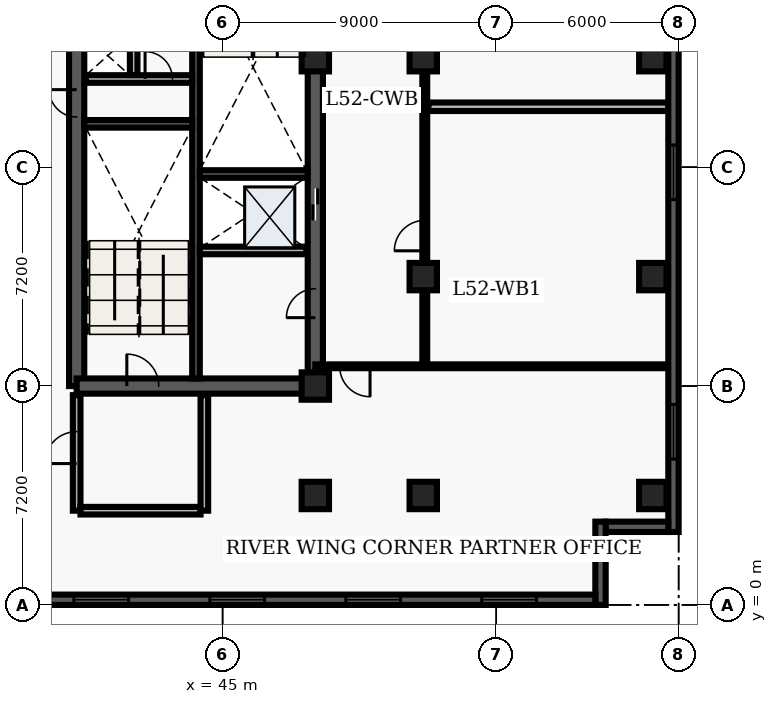
"""IFC4 building model, lengths in metres.
Left out: names, types, materials, properties, quantities, classifications, styles, units other than length and angle.
Written with IfcOpenShell. Run it as: python <this file> out.ifc"""

import sys

from ifc_helpers import new_model, entity, si_unit, converted_unit, direction, frame, origin_with_axes, origin_2d_with_axis, place, context, subcontext, project, spatial, polyline, rectangle, outline, extrude, element, fill, save


model = new_model("IFC4")
c1 = context("Model", 3, precision=1e-05, world=origin_with_axes(), true_north=direction((0.0, 1.0)))
c2 = subcontext(c1, "Body", "Model", "MODEL_VIEW")
j1 = project(units=[si_unit("LENGTHUNIT", "METRE"), converted_unit("PLANEANGLEUNIT", "DEGREE", entity("IfcPlaneAngleMeasure", 0.017), si_unit("PLANEANGLEUNIT", "RADIAN"), dimensions=[0, 0, 0, 0, 0, 0, 0])], contexts=[c1])
p1 = place(None, origin_with_axes())
s1 = spatial("IfcSite", under=j1, at=p1, CompositionType="ELEMENT")
p2 = place(p1, origin_with_axes())
s2 = spatial("IfcBuilding", under=s1, at=p2, CompositionType="ELEMENT")
p3 = place(p2, frame((0.0, 0.0, 212.1), z_axis=(0.0, 0.0, 1.0), x_axis=(1.0, 0.0, 0.0)))
s3 = spatial("IfcBuildingStorey", under=s2, at=p3, CompositionType="ELEMENT", Elevation=212.1)
p4 = place(p3, frame((40.2, 7.2, 0.0), z_axis=(0.0, 0.0, 1.0), x_axis=(0.0, 1.0, 0.0)))
e1 = element("IfcWall", 1, at=p4, inside=s3, PredefinedType="SHEAR", context=c2, shape_type="SweptSolid", body=[
    extrude(outline(polyline([(0.0, -0.25), (15.6, -0.25), (15.6, 0.25), (0.0, 0.25), (0.0, -0.25)])), origin_with_axes(), (0.0, 0.0, 1.0), 3.66),
])
p5 = place(p4, frame((14.475, 0.0, 0.0), z_axis=(0.0, 0.0, 1.0), x_axis=(1.0, 0.0, 0.0)))
e2 = element("IfcOpeningElement", 2, at=p5, cuts=e1, PredefinedType="OPENING", context=c2, shape_type="SweptSolid", body=[
    extrude(rectangle(XDim=1.05, YDim=0.52, at=origin_2d_with_axis()), origin_with_axes(), (0.0, 0.0, 1.0), 2.15),
])
p6 = place(p4, frame((12.75, 0.0, 0.0), z_axis=(0.0, 0.0, 1.0), x_axis=(1.0, 0.0, 0.0)))
e3 = element("IfcOpeningElement", 3, at=p6, cuts=e1, PredefinedType="OPENING", context=c2, shape_type="SweptSolid", body=[
    extrude(rectangle(XDim=1.2, YDim=0.52, at=origin_2d_with_axis()), origin_with_axes(), (0.0, 0.0, 1.0), 2.15),
])
p7 = place(p4, frame((9.3, 0.0, 0.0), z_axis=(0.0, 0.0, 1.0), x_axis=(1.0, 0.0, 0.0)))
e4 = element("IfcOpeningElement", 4, at=p7, cuts=e1, PredefinedType="OPENING", context=c2, shape_type="SweptSolid", body=[
    extrude(rectangle(XDim=0.9, YDim=0.52, at=origin_2d_with_axis()), origin_with_axes(), (0.0, 0.0, 1.0), 2.15),
])
p8 = place(p3, frame((40.2, 7.2, 0.0), z_axis=(0.0, 0.0, 1.0), x_axis=(1.0, 0.0, 0.0)))
e5 = element("IfcWall", 5, at=p8, inside=s3, PredefinedType="SHEAR", context=c2, shape_type="SweptSolid", body=[
    extrude(outline(polyline([(0.0, -0.25), (7.85, -0.25), (7.85, 0.25), (0.0, 0.25), (0.0, -0.25)])), origin_with_axes(), (0.0, 0.0, 1.0), 3.66),
])
p9 = place(p8, frame((2.175, 0.0, 0.0), z_axis=(0.0, 0.0, 1.0), x_axis=(1.0, 0.0, 0.0)))
e6 = element("IfcOpeningElement", 6, at=p9, cuts=e5, PredefinedType="OPENING", context=c2, shape_type="SweptSolid", body=[
    extrude(rectangle(XDim=1.05, YDim=0.52, at=origin_2d_with_axis()), origin_with_axes(), (0.0, 0.0, 1.0), 2.15),
])
p10 = place(p3, frame((48.05, 7.2, 0.0), z_axis=(0.0, 0.0, 1.0), x_axis=(0.0, 1.0, 0.0)))
e7 = element("IfcWall", 7, at=p10, inside=s3, PredefinedType="SHEAR", context=c2, shape_type="SweptSolid", body=[
    extrude(outline(polyline([(0.0, -0.25), (15.6, -0.25), (15.6, 0.25), (0.0, 0.25), (0.0, -0.25)])), origin_with_axes(), (0.0, 0.0, 1.0), 3.66),
])
p11 = place(p10, frame((5.975, 0.0, 0.0), z_axis=(0.0, 0.0, 1.0), x_axis=(1.0, 0.0, 0.0)))
e8 = element("IfcOpeningElement", 8, at=p11, cuts=e7, PredefinedType="OPENING", context=c2, shape_type="SweptSolid", body=[
    extrude(rectangle(XDim=1.05, YDim=0.52, at=origin_2d_with_axis()), origin_with_axes(), (0.0, 0.0, 1.0), 2.15),
])
p12 = place(p10, frame((2.725, 0.0, 0.0), z_axis=(0.0, 0.0, 1.0), x_axis=(1.0, 0.0, 0.0)))
e9 = element("IfcOpeningElement", 9, at=p12, cuts=e7, PredefinedType="OPENING", context=c2, shape_type="SweptSolid", body=[
    extrude(rectangle(XDim=0.95, YDim=0.52, at=origin_2d_with_axis()), origin_with_axes(), (0.0, 0.0, 1.0), 2.15),
])
p13 = place(p3, frame((44.125, 7.45, 0.0), z_axis=(0.0, 0.0, 1.0), x_axis=(0.0, 1.0, 0.0)))
e10 = element("IfcWall", 10, at=p13, inside=s3, PredefinedType="SHEAR", context=c2, shape_type="SweptSolid", body=[
    extrude(outline(polyline([(0.0, -0.125), (15.1, -0.125), (15.1, 0.125), (0.0, 0.125), (0.0, -0.125)])), origin_with_axes(), (0.0, 0.0, 1.0), 3.66),
])
for number, where, z_axis, x_axis in (
    (11, (40.45, 15.825, 0.0), (0.0, 0.0, 1.0), (1.0, 0.0, 0.0)),
    (12, (44.25, 14.175, 0.0), (0.0, 0.0, 1.0), (1.0, 0.0, 0.0)),
):
    element("IfcWall", number, at=place(p3, frame(where, z_axis=z_axis, x_axis=x_axis)), inside=s3, PredefinedType="SHEAR", context=c2, shape_type="SweptSolid", body=[
        extrude(outline(polyline([(0.0, -0.125), (3.55, -0.125), (3.55, 0.125), (0.0, 0.125), (0.0, -0.125)])), origin_with_axes(), (0.0, 0.0, 1.0), 3.66),
    ])
p14 = place(p3, frame((40.5, 17.3, 0.0), z_axis=(0.0, 0.0, 1.0), x_axis=(1.0, 0.0, 0.0)))
e13 = element("IfcWall", 13, at=p14, inside=s3, PredefinedType="SOLIDWALL", context=c2, shape_type="SweptSolid", body=[
    extrude(outline(polyline([(0.0, -0.125), (3.5, -0.125), (3.5, 0.125), (0.0, 0.125), (0.0, -0.125)])), origin_with_axes(), (0.0, 0.0, 1.0), 2.7),
])
p15 = place(p14, frame((2.4, 0.0, 0.0), z_axis=(0.0, 0.0, 1.0), x_axis=(1.0, 0.0, 0.0)))
e14 = element("IfcOpeningElement", 14, at=p15, cuts=e13, PredefinedType="OPENING", context=c2, shape_type="SweptSolid", body=[
    extrude(rectangle(XDim=0.9, YDim=0.27, at=origin_2d_with_axis()), origin_with_axes(), (0.0, 0.0, 1.0), 2.15),
])
p16 = place(p3, frame((42.075, 17.43, 0.0), z_axis=(0.0, 0.0, 1.0), x_axis=(0.0, 1.0, 0.0)))
e15 = element("IfcWall", 15, at=p16, inside=s3, PredefinedType="SOLIDWALL", context=c2, shape_type="SweptSolid", body=[
    extrude(outline(polyline([(0.0, -0.125), (1.24, -0.125), (1.24, 0.125), (0.0, 0.125), (0.0, -0.125)])), origin_with_axes(), (0.0, 0.0, 1.0), 2.7),
])
p17 = place(p3, frame((40.2, 3.1, 0.0), z_axis=(0.0, 0.0, 1.0), x_axis=(0.0, 1.0, 0.0)))
e16 = element("IfcWall", 16, at=p17, inside=s3, PredefinedType="SOLIDWALL", context=c2, shape_type="SweptSolid", body=[
    extrude(outline(polyline([(0.0, -0.125), (3.8, -0.125), (3.8, 0.125), (0.0, 0.125), (0.0, -0.125)])), origin_with_axes(), (0.0, 0.0, 1.0), 2.7),
])
p18 = place(p17, frame((2.075, 0.0, 0.0), z_axis=(0.0, 0.0, 1.0), x_axis=(1.0, 0.0, 0.0)))
e17 = element("IfcOpeningElement", 17, at=p18, cuts=e16, PredefinedType="OPENING", context=c2, shape_type="SweptSolid", body=[
    extrude(rectangle(XDim=1.05, YDim=0.27, at=origin_2d_with_axis()), origin_with_axes(), (0.0, 0.0, 1.0), 2.15),
])
p19 = place(p3, frame((40.325, 3.1, 0.0), z_axis=(0.0, 0.0, 1.0), x_axis=(1.0, 0.0, 0.0)))
e18 = element("IfcWall", 18, at=p19, inside=s3, PredefinedType="SOLIDWALL", context=c2, shape_type="SweptSolid", body=[
    extrude(outline(polyline([(0.0, -0.125), (3.95, -0.125), (3.95, 0.125), (0.0, 0.125), (0.0, -0.125)])), origin_with_axes(), (0.0, 0.0, 1.0), 2.7),
])
p20 = place(p3, frame((44.4, 3.1, 0.0), z_axis=(0.0, 0.0, 1.0), x_axis=(0.0, 1.0, 0.0)))
e19 = element("IfcWall", 19, at=p20, inside=s3, PredefinedType="SOLIDWALL", context=c2, shape_type="SweptSolid", body=[
    extrude(outline(polyline([(0.0, -0.125), (3.8, -0.125), (3.8, 0.125), (0.0, 0.125), (0.0, -0.125)])), origin_with_axes(), (0.0, 0.0, 1.0), 2.7),
])
for number, where, z_axis, x_axis in (
    (20, (48.05, 3.6, 0.0), (0.0, 0.0, 1.0), (1.0, 0.0, 0.0)),
    (21, (48.05, 7.2, 0.0), (0.0, 0.0, 1.0), (1.0, 0.0, 0.0)),
    (22, (48.05, 18.0, 0.0), (0.0, 0.0, 1.0), (1.0, 0.0, 0.0)),
    (23, (51.6, 3.6, 0.0), (0.0, 0.0, 1.0), (1.0, 0.0, 0.0)),
    (24, (51.6, 10.8, 0.0), (0.0, 0.0, 1.0), (1.0, 0.0, 0.0)),
    (25, (51.6, 18.0, 0.0), (0.0, 0.0, 1.0), (1.0, 0.0, 0.0)),
    (26, (59.15, 3.6, 0.0), (0.0, 0.0, 1.0), (1.0, 0.0, 0.0)),
    (27, (59.15, 10.8, 0.0), (0.0, 0.0, 1.0), (1.0, 0.0, 0.0)),
    (28, (59.15, 18.0, 0.0), (0.0, 0.0, 1.0), (1.0, 0.0, 0.0)),
):
    element("IfcColumn", number, at=place(p3, frame(where, z_axis=z_axis, x_axis=x_axis)), inside=s3, PredefinedType="COLUMN", context=c2, shape_type="SweptSolid", body=[
        extrude(rectangle(XDim=0.9, YDim=0.9, at=origin_2d_with_axis()), origin_with_axes(), (0.0, 0.0, 1.0), 3.9),
    ])
p21 = place(p3, frame((44.25, 11.66, 0.0), z_axis=(0.0, 0.0, 1.0), x_axis=(1.0, 0.0, 0.0)))
e29 = element("IfcWall", 29, at=p21, inside=s3, PredefinedType="SOLIDWALL", context=c2, shape_type="SweptSolid", body=[
    extrude(outline(polyline([(0.0, -0.125), (3.5, -0.125), (3.5, 0.125), (0.0, 0.125), (0.0, -0.125)])), origin_with_axes(), (0.0, 0.0, 1.0), 2.7),
])
p22 = place(p3, frame((51.65, 7.85, 0.0), z_axis=(0.0, 0.0, 1.0), x_axis=(0.0, 1.0, 0.0)))
e30 = element("IfcWall", 30, at=p22, inside=s3, PredefinedType="PARTITIONING", context=c2, shape_type="SweptSolid", body=[
    extrude(outline(polyline([(0.0, -0.08), (18.8, -0.08), (18.8, 0.08), (0.0, 0.08), (0.0, -0.08)])), origin_with_axes(), (0.0, 0.0, 1.0), 2.7),
])
p23 = place(p22, frame((4.298, 0.0, 0.0), z_axis=(0.0, 0.0, 1.0), x_axis=(1.0, 0.0, 0.0)))
e31 = element("IfcOpeningElement", 31, at=p23, cuts=e30, PredefinedType="OPENING", context=c2, shape_type="SweptSolid", body=[
    extrude(rectangle(XDim=1.0, YDim=0.18, at=origin_2d_with_axis()), origin_with_axes(), (0.0, 0.0, 1.0), 2.15),
])
p24 = place(p22, frame((13.639, 0.0, 0.0), z_axis=(0.0, 0.0, 1.0), x_axis=(1.0, 0.0, 0.0)))
e32 = element("IfcOpeningElement", 32, at=p24, cuts=e30, PredefinedType="OPENING", context=c2, shape_type="SweptSolid", body=[
    extrude(rectangle(XDim=1.0, YDim=0.18, at=origin_2d_with_axis()), origin_with_axes(), (0.0, 0.0, 1.0), 2.15),
])
p25 = place(p3, frame((59.665, 7.85, 0.0), z_axis=(0.0, 0.0, 1.0), x_axis=(-1.0, 0.0, 0.0)))
e33 = element("IfcWall", 33, at=p25, inside=s3, PredefinedType="PARTITIONING", context=c2, shape_type="SweptSolid", body=[
    extrude(outline(polyline([(0.0, -0.062), (11.615, -0.062), (11.615, 0.062), (0.0, 0.062), (0.0, -0.062)])), origin_with_axes(), (0.0, 0.0, 1.0), 2.7),
])
p26 = place(p25, frame((10.315, 0.0, 0.0), z_axis=(0.0, 0.0, 1.0), x_axis=(1.0, 0.0, 0.0)))
e34 = element("IfcOpeningElement", 34, at=p26, cuts=e33, PredefinedType="OPENING", context=c2, shape_type="SweptSolid", body=[
    extrude(rectangle(XDim=1.0, YDim=0.145, at=origin_2d_with_axis()), origin_with_axes(), (0.0, 0.0, 1.0), 2.15),
])
p27 = place(p3, frame((51.77, 16.387, 0.0), z_axis=(0.0, 0.0, 1.0), x_axis=(1.0, 0.0, 0.0)))
e35 = element("IfcWall", 35, at=p27, inside=s3, PredefinedType="PARTITIONING", context=c2, shape_type="SweptSolid", body=[
    extrude(outline(polyline([(0.0, -0.14), (7.895, -0.14), (7.895, 0.14), (0.0, 0.14), (0.0, -0.14)])), origin_with_axes(), (0.0, 0.0, 1.0), 2.7),
])
p28 = place(p3, frame((59.83, 26.06, 0.0), z_axis=(0.0, 0.0, 1.0), x_axis=(0.0, -1.0, 0.0)))
e36 = element("IfcWall", 36, at=p28, inside=s3, PredefinedType="SOLIDWALL", context=c2, shape_type="SweptSolid", body=[
    extrude(outline(polyline([(0.0, -0.17), (23.66, -0.17), (23.66, 0.17), (0.0, 0.17), (0.0, -0.17)])), origin_with_axes(), (0.0, 0.0, 1.0), 3.66),
])
p29 = place(p28, frame((3.696, 0.0, 0.45), z_axis=(0.0, 0.0, 1.0), x_axis=(1.0, 0.0, 0.0)))
e37 = element("IfcOpeningElement", 37, at=p29, cuts=e36, PredefinedType="OPENING", context=c2, shape_type="SweptSolid", body=[
    extrude(rectangle(XDim=1.8, YDim=0.36, at=origin_2d_with_axis()), origin_with_axes(), (0.0, 0.0, 1.0), 2.1),
])
p30 = place(p28, frame((11.83, 0.0, 0.45), z_axis=(0.0, 0.0, 1.0), x_axis=(1.0, 0.0, 0.0)))
e38 = element("IfcOpeningElement", 38, at=p30, cuts=e36, PredefinedType="OPENING", context=c2, shape_type="SweptSolid", body=[
    extrude(rectangle(XDim=1.8, YDim=0.36, at=origin_2d_with_axis()), origin_with_axes(), (0.0, 0.0, 1.0), 2.1),
])
p31 = place(p28, frame((20.364, 0.0, 0.45), z_axis=(0.0, 0.0, 1.0), x_axis=(1.0, 0.0, 0.0)))
e39 = element("IfcOpeningElement", 39, at=p31, cuts=e36, PredefinedType="OPENING", context=c2, shape_type="SweptSolid", body=[
    extrude(rectangle(XDim=1.8, YDim=0.36, at=origin_2d_with_axis()), origin_with_axes(), (0.0, 0.0, 1.0), 2.1),
])
p32 = place(p3, frame((59.66, 2.57, 0.0), z_axis=(0.0, 0.0, 1.0), x_axis=(-1.0, 0.0, 0.0)))
e40 = element("IfcWall", 40, at=p32, inside=s3, PredefinedType="SOLIDWALL", context=c2, shape_type="SweptSolid", body=[
    extrude(outline(polyline([(0.0, -0.17), (2.06, -0.17), (2.06, 0.17), (0.0, 0.17), (0.0, -0.17)])), origin_with_axes(), (0.0, 0.0, 1.0), 3.66),
])
p33 = place(p3, frame((57.43, 2.74, 0.0), z_axis=(0.0, 0.0, 1.0), x_axis=(0.0, -1.0, 0.0)))
e41 = element("IfcWall", 41, at=p33, inside=s3, PredefinedType="SOLIDWALL", context=c2, shape_type="SweptSolid", body=[
    extrude(outline(polyline([(0.0, -0.17), (2.74, -0.17), (2.74, 0.17), (0.0, 0.17), (0.0, -0.17)])), origin_with_axes(), (0.0, 0.0, 1.0), 3.66),
])
p34 = place(p3, frame((57.26, 0.17, 0.0), z_axis=(0.0, 0.0, 1.0), x_axis=(-1.0, 0.0, 0.0)))
e42 = element("IfcWall", 42, at=p34, inside=s3, PredefinedType="SOLIDWALL", context=c2, shape_type="SweptSolid", body=[
    extrude(outline(polyline([(0.0, -0.17), (54.86, -0.17), (54.86, 0.17), (0.0, 0.17), (0.0, -0.17)])), origin_with_axes(), (0.0, 0.0, 1.0), 3.66),
])
p35 = place(p34, frame((2.836, 0.0, 0.45), z_axis=(0.0, 0.0, 1.0), x_axis=(1.0, 0.0, 0.0)))
e43 = element("IfcOpeningElement", 43, at=p35, cuts=e42, PredefinedType="OPENING", context=c2, shape_type="SweptSolid", body=[
    extrude(rectangle(XDim=1.8, YDim=0.36, at=origin_2d_with_axis()), origin_with_axes(), (0.0, 0.0, 1.0), 2.1),
])
p36 = place(p34, frame((7.307, 0.0, 0.45), z_axis=(0.0, 0.0, 1.0), x_axis=(1.0, 0.0, 0.0)))
e44 = element("IfcOpeningElement", 44, at=p36, cuts=e42, PredefinedType="OPENING", context=c2, shape_type="SweptSolid", body=[
    extrude(rectangle(XDim=1.8, YDim=0.36, at=origin_2d_with_axis()), origin_with_axes(), (0.0, 0.0, 1.0), 2.1),
])
p37 = place(p34, frame((11.779, 0.0, 0.45), z_axis=(0.0, 0.0, 1.0), x_axis=(1.0, 0.0, 0.0)))
e45 = element("IfcOpeningElement", 45, at=p37, cuts=e42, PredefinedType="OPENING", context=c2, shape_type="SweptSolid", body=[
    extrude(rectangle(XDim=1.8, YDim=0.36, at=origin_2d_with_axis()), origin_with_axes(), (0.0, 0.0, 1.0), 2.1),
])
p38 = place(p34, frame((16.251, 0.0, 0.45), z_axis=(0.0, 0.0, 1.0), x_axis=(1.0, 0.0, 0.0)))
e46 = element("IfcOpeningElement", 46, at=p38, cuts=e42, PredefinedType="OPENING", context=c2, shape_type="SweptSolid", body=[
    extrude(rectangle(XDim=1.8, YDim=0.36, at=origin_2d_with_axis()), origin_with_axes(), (0.0, 0.0, 1.0), 2.1),
])
p39 = place(p34, frame((20.723, 0.0, 0.45), z_axis=(0.0, 0.0, 1.0), x_axis=(1.0, 0.0, 0.0)))
e47 = element("IfcOpeningElement", 47, at=p39, cuts=e42, PredefinedType="OPENING", context=c2, shape_type="SweptSolid", body=[
    extrude(rectangle(XDim=1.8, YDim=0.36, at=origin_2d_with_axis()), origin_with_axes(), (0.0, 0.0, 1.0), 2.1),
])
p40 = place(p34, frame((25.194, 0.0, 0.45), z_axis=(0.0, 0.0, 1.0), x_axis=(1.0, 0.0, 0.0)))
e48 = element("IfcOpeningElement", 48, at=p40, cuts=e42, PredefinedType="OPENING", context=c2, shape_type="SweptSolid", body=[
    extrude(rectangle(XDim=1.8, YDim=0.36, at=origin_2d_with_axis()), origin_with_axes(), (0.0, 0.0, 1.0), 2.1),
])
p41 = place(p34, frame((29.666, 0.0, 0.45), z_axis=(0.0, 0.0, 1.0), x_axis=(1.0, 0.0, 0.0)))
e49 = element("IfcOpeningElement", 49, at=p41, cuts=e42, PredefinedType="OPENING", context=c2, shape_type="SweptSolid", body=[
    extrude(rectangle(XDim=1.8, YDim=0.36, at=origin_2d_with_axis()), origin_with_axes(), (0.0, 0.0, 1.0), 2.1),
])
p42 = place(p34, frame((34.138, 0.0, 0.45), z_axis=(0.0, 0.0, 1.0), x_axis=(1.0, 0.0, 0.0)))
e50 = element("IfcOpeningElement", 50, at=p42, cuts=e42, PredefinedType="OPENING", context=c2, shape_type="SweptSolid", body=[
    extrude(rectangle(XDim=1.8, YDim=0.36, at=origin_2d_with_axis()), origin_with_axes(), (0.0, 0.0, 1.0), 2.1),
])
p43 = place(p34, frame((38.609, 0.0, 0.45), z_axis=(0.0, 0.0, 1.0), x_axis=(1.0, 0.0, 0.0)))
e51 = element("IfcOpeningElement", 51, at=p43, cuts=e42, PredefinedType="OPENING", context=c2, shape_type="SweptSolid", body=[
    extrude(rectangle(XDim=1.8, YDim=0.36, at=origin_2d_with_axis()), origin_with_axes(), (0.0, 0.0, 1.0), 2.1),
])
p44 = place(p34, frame((43.531, 0.0, 0.45), z_axis=(0.0, 0.0, 1.0), x_axis=(1.0, 0.0, 0.0)))
e52 = element("IfcOpeningElement", 52, at=p44, cuts=e42, PredefinedType="OPENING", context=c2, shape_type="SweptSolid", body=[
    extrude(rectangle(XDim=1.8, YDim=0.36, at=origin_2d_with_axis()), origin_with_axes(), (0.0, 0.0, 1.0), 2.1),
])
p45 = place(p34, frame((47.553, 0.0, 0.45), z_axis=(0.0, 0.0, 1.0), x_axis=(1.0, 0.0, 0.0)))
e53 = element("IfcOpeningElement", 53, at=p45, cuts=e42, PredefinedType="OPENING", context=c2, shape_type="SweptSolid", body=[
    extrude(rectangle(XDim=1.8, YDim=0.36, at=origin_2d_with_axis()), origin_with_axes(), (0.0, 0.0, 1.0), 2.1),
])
p46 = place(p34, frame((52.474, 0.0, 0.45), z_axis=(0.0, 0.0, 1.0), x_axis=(1.0, 0.0, 0.0)))
e54 = element("IfcOpeningElement", 54, at=p46, cuts=e42, PredefinedType="OPENING", context=c2, shape_type="SweptSolid", body=[
    extrude(rectangle(XDim=1.8, YDim=0.36, at=origin_2d_with_axis()), origin_with_axes(), (0.0, 0.0, 1.0), 2.1),
])
p47 = place(p10, frame((5.975, 0.0, 0.0), z_axis=(0.0, 0.0, 1.0), x_axis=(1.0, 0.0, 0.0)))
e55 = element("IfcDoor", 55, at=p47, inside=s3, OperationType="SLIDING_TO_LEFT", PredefinedType="DOOR", context=c2, shape_type="SweptSolid", body=[
    extrude(rectangle(XDim=1.05, YDim=0.09, at=origin_2d_with_axis()), origin_with_axes(), (0.0, 0.0, 1.0), 2.15),
])
fill(e8, e55)
p48 = place(p4, frame((9.3, 0.0, 0.0), z_axis=(0.0, 0.0, 1.0), x_axis=(1.0, 0.0, 0.0)))
e56 = element("IfcDoor", 56, at=p48, inside=s3, OperationType="SINGLE_SWING_RIGHT", PredefinedType="DOOR", context=c2, shape_type="SweptSolid", body=[
    extrude(rectangle(XDim=0.9, YDim=0.09, at=origin_2d_with_axis()), origin_with_axes(), (0.0, 0.0, 1.0), 2.15),
])
fill(e4, e56)
p49 = place(p14, frame((2.4, 0.0, 0.0), z_axis=(0.0, 0.0, 1.0), x_axis=(1.0, 0.0, 0.0)))
e57 = element("IfcDoor", 57, at=p49, inside=s3, OperationType="SINGLE_SWING_LEFT", PredefinedType="DOOR", context=c2, shape_type="SweptSolid", body=[
    extrude(rectangle(XDim=0.9, YDim=0.09, at=origin_2d_with_axis()), origin_with_axes(), (0.0, 0.0, 1.0), 2.15),
])
fill(e14, e57)
p50 = place(p8, frame((2.175, 0.0, 0.0), z_axis=(0.0, 0.0, 1.0), x_axis=(1.0, 0.0, 0.0)))
e58 = element("IfcDoor", 58, at=p50, inside=s3, OperationType="SINGLE_SWING_LEFT", PredefinedType="DOOR", context=c2, shape_type="SweptSolid", body=[
    extrude(rectangle(XDim=1.05, YDim=0.09, at=origin_2d_with_axis()), origin_with_axes(), (0.0, 0.0, 1.0), 2.15),
])
fill(e6, e58)
p51 = place(p17, frame((2.075, 0.0, 0.0), z_axis=(0.0, 0.0, 1.0), x_axis=(1.0, 0.0, 0.0)))
e59 = element("IfcDoor", 59, at=p51, inside=s3, OperationType="SINGLE_SWING_LEFT", PredefinedType="DOOR", context=c2, shape_type="SweptSolid", body=[
    extrude(rectangle(XDim=1.05, YDim=0.09, at=origin_2d_with_axis()), origin_with_axes(), (0.0, 0.0, 1.0), 2.15),
])
fill(e17, e59)
p52 = place(p10, frame((2.725, 0.0, 0.0), z_axis=(0.0, 0.0, 1.0), x_axis=(1.0, 0.0, 0.0)))
e60 = element("IfcDoor", 60, at=p52, inside=s3, OperationType="SINGLE_SWING_LEFT", PredefinedType="DOOR", context=c2, shape_type="SweptSolid", body=[
    extrude(rectangle(XDim=0.95, YDim=0.09, at=origin_2d_with_axis()), origin_with_axes(), (0.0, 0.0, 1.0), 2.15),
])
fill(e9, e60)
p53 = place(p25, frame((10.315, 0.0, 0.0), z_axis=(0.0, 0.0, 1.0), x_axis=(1.0, 0.0, 0.0)))
e61 = element("IfcDoor", 61, at=p53, inside=s3, OperationType="SINGLE_SWING_LEFT", PredefinedType="DOOR", context=c2, shape_type="SweptSolid", body=[
    extrude(rectangle(XDim=1.0, YDim=0.075, at=origin_2d_with_axis()), origin_with_axes(), (0.0, 0.0, 1.0), 2.15),
])
fill(e34, e61)
p54 = place(p22, frame((4.298, 0.0, 0.0), z_axis=(0.0, 0.0, 1.0), x_axis=(1.0, 0.0, 0.0)))
e62 = element("IfcDoor", 62, at=p54, inside=s3, OperationType="SINGLE_SWING_LEFT", PredefinedType="DOOR", context=c2, shape_type="SweptSolid", body=[
    extrude(rectangle(XDim=1.0, YDim=0.09, at=origin_2d_with_axis()), origin_with_axes(), (0.0, 0.0, 1.0), 2.15),
])
fill(e31, e62)
p55 = place(p28, frame((11.83, 0.0, 0.45), z_axis=(0.0, 0.0, 1.0), x_axis=(1.0, 0.0, 0.0)))
e63 = element("IfcWindow", 63, at=p55, inside=s3, PredefinedType="WINDOW", context=c2, shape_type="SweptSolid", body=[
    extrude(rectangle(XDim=1.8, YDim=0.09, at=origin_2d_with_axis()), origin_with_axes(), (0.0, 0.0, 1.0), 2.1),
])
fill(e38, e63)
p56 = place(p28, frame((20.364, 0.0, 0.45), z_axis=(0.0, 0.0, 1.0), x_axis=(1.0, 0.0, 0.0)))
e64 = element("IfcWindow", 64, at=p56, inside=s3, PredefinedType="WINDOW", context=c2, shape_type="SweptSolid", body=[
    extrude(rectangle(XDim=1.8, YDim=0.09, at=origin_2d_with_axis()), origin_with_axes(), (0.0, 0.0, 1.0), 2.1),
])
fill(e39, e64)
p57 = place(p34, frame((2.836, 0.0, 0.45), z_axis=(0.0, 0.0, 1.0), x_axis=(1.0, 0.0, 0.0)))
e65 = element("IfcWindow", 65, at=p57, inside=s3, PredefinedType="WINDOW", context=c2, shape_type="SweptSolid", body=[
    extrude(rectangle(XDim=1.8, YDim=0.09, at=origin_2d_with_axis()), origin_with_axes(), (0.0, 0.0, 1.0), 2.1),
])
fill(e43, e65)
p58 = place(p34, frame((7.307, 0.0, 0.45), z_axis=(0.0, 0.0, 1.0), x_axis=(1.0, 0.0, 0.0)))
e66 = element("IfcWindow", 66, at=p58, inside=s3, PredefinedType="WINDOW", context=c2, shape_type="SweptSolid", body=[
    extrude(rectangle(XDim=1.8, YDim=0.09, at=origin_2d_with_axis()), origin_with_axes(), (0.0, 0.0, 1.0), 2.1),
])
fill(e44, e66)
p59 = place(p34, frame((11.779, 0.0, 0.45), z_axis=(0.0, 0.0, 1.0), x_axis=(1.0, 0.0, 0.0)))
e67 = element("IfcWindow", 67, at=p59, inside=s3, PredefinedType="WINDOW", context=c2, shape_type="SweptSolid", body=[
    extrude(rectangle(XDim=1.8, YDim=0.09, at=origin_2d_with_axis()), origin_with_axes(), (0.0, 0.0, 1.0), 2.1),
])
fill(e45, e67)
p60 = place(p34, frame((16.251, 0.0, 0.45), z_axis=(0.0, 0.0, 1.0), x_axis=(1.0, 0.0, 0.0)))
e68 = element("IfcWindow", 68, at=p60, inside=s3, PredefinedType="WINDOW", context=c2, shape_type="SweptSolid", body=[
    extrude(rectangle(XDim=1.8, YDim=0.09, at=origin_2d_with_axis()), origin_with_axes(), (0.0, 0.0, 1.0), 2.1),
])
fill(e46, e68)
save(model, sys.argv[1])
